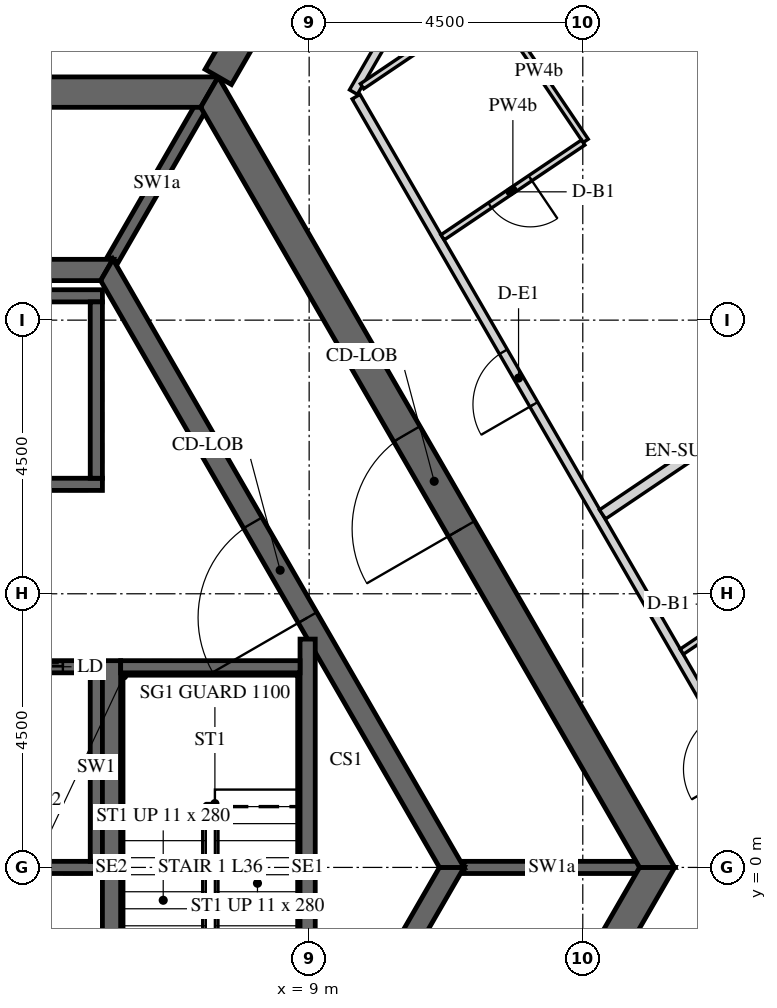
"""IFC4 building model, lengths in metres.
Left out: names, types, materials, properties, quantities, classifications, styles, units other than length and angle.
Written with IfcOpenShell. Run it as: python <this file> out.ifc"""

import sys

from ifc_helpers import new_model, si_unit, direction, frame, frame_2d, origin, place, context, subcontext, project, spatial, polyline, rectangle, outline, extrude, element, fill, save


model = new_model("IFC4")
c1 = context("Model", 3, precision=1e-05, world=origin(), true_north=direction((0.0, 1.0)))
c2 = subcontext(c1, "Body", "Model", "MODEL_VIEW")
j1 = project(units=[si_unit("LENGTHUNIT", "METRE"), si_unit("PLANEANGLEUNIT", "RADIAN")], contexts=[c1])
p1 = place(None, origin())
s1 = spatial("IfcSite", under=j1, at=p1, CompositionType="ELEMENT")
p2 = place(p1, origin())
s2 = spatial("IfcBuilding", under=s1, at=p2, CompositionType="ELEMENT")
p3 = place(p2, frame((0.0, 0.0, 156.6)))
s3 = spatial("IfcBuildingStorey", under=s2, at=p3, CompositionType="ELEMENT", Elevation=156.6)
p4 = place(p3, frame((7.361, -12.75, -0.15), z_axis=(0.0, 0.0, 1.0), x_axis=(0.50000571537, 0.866022103989, 0.0)))
e1 = element("IfcWall", 1, at=p4, inside=s3, PredefinedType="SHEAR", context=c2, shape_type="SweptSolid", body=[
    extrude(outline(polyline([(-0.144, -0.25), (14.867, -0.25), (14.578, 0.25), (0.144, 0.25), (-0.144, -0.25)])), origin(), (0.0, 0.0, 1.0), 3.9),
])
p5 = place(p4, frame((6.49, 0.0, 0.15)))
e2 = element("IfcOpeningElement", 2, at=p5, cuts=e1, PredefinedType="OPENING", context=c2, shape_type="SweptSolid", body=[
    extrude(rectangle(XDim=1.8, YDim=2.4, at=frame_2d((0.9, 1.2))), frame((0.0, 0.26, 0.0), z_axis=(0.0, -1.0, 0.0), x_axis=(1.0, 0.0, 0.0)), (0.0, 0.0, 1.0), 0.52),
])
p6 = place(p3, frame((14.722, 0.0, -0.15), z_axis=(0.0, 0.0, 1.0), x_axis=(-0.50000571537, 0.866022103989, 0.0)))
e3 = element("IfcWall", 3, at=p6, inside=s3, PredefinedType="SHEAR", context=c2, shape_type="SweptSolid", body=[
    extrude(outline(polyline([(-0.144, -0.25), (14.867, -0.25), (14.578, 0.25), (0.144, 0.25), (-0.144, -0.25)])), origin(), (0.0, 0.0, 1.0), 3.9),
])
p7 = place(p6, frame((6.432, 0.0, 0.15)))
e4 = element("IfcOpeningElement", 4, at=p7, cuts=e3, PredefinedType="OPENING", context=c2, shape_type="SweptSolid", body=[
    extrude(rectangle(XDim=1.8, YDim=2.4, at=frame_2d((0.9, 1.2))), frame((0.0, 0.26, 0.0), z_axis=(0.0, -1.0, 0.0), x_axis=(1.0, 0.0, 0.0)), (0.0, 0.0, 1.0), 0.52),
])
p8 = place(p3, frame((7.361, 12.75, -0.15), z_axis=(0.0, 0.0, 1.0), x_axis=(-1.0, 0.0, 0.0)))
e5 = element("IfcWall", 5, at=p8, inside=s3, PredefinedType="SHEAR", context=c2, shape_type="SweptSolid", body=[
    extrude(outline(polyline([(-0.144, -0.25), (14.866, -0.25), (14.578, 0.25), (0.144, 0.25), (-0.144, -0.25)])), origin(), (0.0, 0.0, 1.0), 3.9),
])
p9 = place(p8, frame((6.761, 0.0, 0.15)))
e6 = element("IfcOpeningElement", 6, at=p9, cuts=e5, PredefinedType="OPENING", context=c2, shape_type="SweptSolid", body=[
    extrude(rectangle(XDim=1.2, YDim=2.4, at=frame_2d((0.6, 1.2))), frame((0.0, 0.26, 0.0), z_axis=(0.0, -1.0, 0.0), x_axis=(1.0, 0.0, 0.0)), (0.0, 0.0, 1.0), 0.52),
])
p10 = place(p3, frame((7.506, 13.0, -0.15), z_axis=(0.0, 0.0, 1.0), x_axis=(0.499988271576, 0.866032175087, 0.0)))
e7 = element("IfcWall", 7, at=p10, inside=s3, PredefinedType="SHEAR", context=c2, shape_type="SweptSolid", body=[
    extrude(rectangle(XDim=15.424, YDim=0.5, at=frame_2d((7.712, 0.0))), origin(), (0.0, 0.0, 1.0), 3.9),
])
p11 = place(p10, frame((6.812, 0.0, 0.15)))
e8 = element("IfcOpeningElement", 8, at=p11, cuts=e7, PredefinedType="OPENING", context=c2, shape_type="SweptSolid", body=[
    extrude(rectangle(XDim=1.8, YDim=2.4, at=frame_2d((0.9, 1.2))), frame((0.0, 0.26, 0.0), z_axis=(0.0, -1.0, 0.0), x_axis=(1.0, 0.0, 0.0)), (0.0, 0.0, 1.0), 0.52),
])
p12 = place(p3, frame((5.673, -9.825, -0.15), z_axis=(0.0, 0.0, 1.0), x_axis=(0.499995046907, 0.866028263435, 0.0)))
e9 = element("IfcWall", 9, at=p12, inside=s3, PredefinedType="SHEAR", context=c2, shape_type="SweptSolid", body=[
    extrude(outline(polyline([(-0.101, -0.175), (11.446, -0.175), (11.244, 0.175), (0.101, 0.175), (-0.101, -0.175)])), origin(), (0.0, 0.0, 1.0), 3.9),
])
p13 = place(p12, frame((4.801, 0.0, 0.15)))
e10 = element("IfcOpeningElement", 10, at=p13, cuts=e9, PredefinedType="OPENING", context=c2, shape_type="SweptSolid", body=[
    extrude(rectangle(XDim=1.8, YDim=2.4, at=frame_2d((0.9, 1.2))), frame((0.0, 0.185, 0.0), z_axis=(0.0, -1.0, 0.0), x_axis=(1.0, 0.0, 0.0)), (0.0, 0.0, 1.0), 0.37),
])
p14 = place(p3, frame((11.345, 0.0, -0.15), z_axis=(0.0, 0.0, 1.0), x_axis=(-0.499995046907, 0.866028263435, 0.0)))
e11 = element("IfcWall", 11, at=p14, inside=s3, PredefinedType="SHEAR", context=c2, shape_type="SweptSolid", body=[
    extrude(outline(polyline([(-0.101, -0.175), (11.446, -0.175), (11.244, 0.175), (0.101, 0.175), (-0.101, -0.175)])), origin(), (0.0, 0.0, 1.0), 3.9),
])
p15 = place(p14, frame((4.744, 0.0, 0.15)))
e12 = element("IfcOpeningElement", 12, at=p15, cuts=e11, PredefinedType="OPENING", context=c2, shape_type="SweptSolid", body=[
    extrude(rectangle(XDim=1.8, YDim=2.4, at=frame_2d((0.9, 1.2))), frame((0.0, 0.185, 0.0), z_axis=(0.0, -1.0, 0.0), x_axis=(1.0, 0.0, 0.0)), (0.0, 0.0, 1.0), 0.37),
])
p16 = place(p3, frame((5.673, 9.825, -0.15), z_axis=(0.0, 0.0, 1.0), x_axis=(-1.0, 0.0, 0.0)))
e13 = element("IfcWall", 13, at=p16, inside=s3, PredefinedType="SHEAR", context=c2, shape_type="SweptSolid", body=[
    extrude(outline(polyline([(-0.101, -0.175), (11.446, -0.175), (11.244, 0.175), (0.101, 0.175), (-0.101, -0.175)])), origin(), (0.0, 0.0, 1.0), 3.9),
])
p17 = place(p3, frame((-5.6, 6.3, -0.25), z_axis=(0.0, 0.0, 1.0), x_axis=(1.0, 0.0, 0.0)))
e14 = element("IfcWall", 14, at=p17, inside=s3, PredefinedType="SHEAR", context=c2, shape_type="SweptSolid", body=[
    extrude(rectangle(XDim=11.2, YDim=0.2, at=frame_2d((5.6, 0.0))), origin(), (0.0, 0.0, 1.0), 3.9),
])
p18 = place(p17, frame((8.45, 0.0, 0.25)))
e15 = element("IfcOpeningElement", 15, at=p18, cuts=e14, PredefinedType="OPENING", context=c2, shape_type="SweptSolid", body=[
    extrude(rectangle(XDim=0.9, YDim=2.1, at=frame_2d((0.45, 1.05))), frame((0.0, 0.11, 0.0), z_axis=(0.0, -1.0, 0.0), x_axis=(1.0, 0.0, 0.0)), (0.0, 0.0, 1.0), 0.22),
])
p19 = place(p17, frame((0.65, 0.0, 0.25)))
e16 = element("IfcOpeningElement", 16, at=p19, cuts=e14, PredefinedType="OPENING", context=c2, shape_type="SweptSolid", body=[
    extrude(rectangle(XDim=1.1, YDim=2.1, at=frame_2d((0.55, 1.05))), frame((0.0, 0.11, 0.0), z_axis=(0.0, -1.0, 0.0), x_axis=(1.0, 0.0, 0.0)), (0.0, 0.0, 1.0), 0.22),
])
p20 = place(p17, frame((2.85, 0.0, 0.25)))
e17 = element("IfcOpeningElement", 17, at=p20, cuts=e14, PredefinedType="OPENING", context=c2, shape_type="SweptSolid", body=[
    extrude(rectangle(XDim=1.1, YDim=2.1, at=frame_2d((0.55, 1.05))), frame((0.0, 0.11, 0.0), z_axis=(0.0, -1.0, 0.0), x_axis=(1.0, 0.0, 0.0)), (0.0, 0.0, 1.0), 0.22),
])
p21 = place(p17, frame((5.05, 0.0, 0.25)))
e18 = element("IfcOpeningElement", 18, at=p21, cuts=e14, PredefinedType="OPENING", context=c2, shape_type="SweptSolid", body=[
    extrude(rectangle(XDim=1.1, YDim=2.1, at=frame_2d((0.55, 1.05))), frame((0.0, 0.11, 0.0), z_axis=(0.0, -1.0, 0.0), x_axis=(1.0, 0.0, 0.0)), (0.0, 0.0, 1.0), 0.22),
])
p22 = place(p3, frame((-5.6, 9.4, -0.25), z_axis=(0.0, 0.0, 1.0), x_axis=(1.0, 0.0, 0.0)))
e19 = element("IfcWall", 19, at=p22, inside=s3, PredefinedType="SHEAR", context=c2, shape_type="SweptSolid", body=[
    extrude(rectangle(XDim=11.2, YDim=0.2, at=frame_2d((5.6, 0.0))), origin(), (0.0, 0.0, 1.0), 3.9),
])
p23 = place(p3, frame((5.5, 6.4, -0.25), z_axis=(0.0, 0.0, 1.0), x_axis=(0.0, 1.0, 0.0)))
e20 = element("IfcWall", 20, at=p23, inside=s3, PredefinedType="SHEAR", context=c2, shape_type="SweptSolid", body=[
    extrude(rectangle(XDim=2.9, YDim=0.2, at=frame_2d((1.45, 0.0))), origin(), (0.0, 0.0, 1.0), 3.9),
])
p24 = place(p3, frame((-5.6, 3.3, -0.25), z_axis=(0.0, 0.0, 1.0), x_axis=(1.0, 0.0, 0.0)))
e21 = element("IfcWall", 21, at=p24, inside=s3, PredefinedType="SHEAR", context=c2, shape_type="SweptSolid", body=[
    extrude(rectangle(XDim=11.2, YDim=0.2, at=frame_2d((5.6, 0.0))), origin(), (0.0, 0.0, 1.0), 3.9),
])
p25 = place(p24, frame((0.65, 0.0, 0.25)))
e22 = element("IfcOpeningElement", 22, at=p25, cuts=e21, PredefinedType="OPENING", context=c2, shape_type="SweptSolid", body=[
    extrude(rectangle(XDim=1.1, YDim=2.1, at=frame_2d((0.55, 1.05))), frame((0.0, 0.11, 0.0), z_axis=(0.0, -1.0, 0.0), x_axis=(1.0, 0.0, 0.0)), (0.0, 0.0, 1.0), 0.22),
])
p26 = place(p24, frame((2.85, 0.0, 0.25)))
e23 = element("IfcOpeningElement", 23, at=p26, cuts=e21, PredefinedType="OPENING", context=c2, shape_type="SweptSolid", body=[
    extrude(rectangle(XDim=1.1, YDim=2.1, at=frame_2d((0.55, 1.05))), frame((0.0, 0.11, 0.0), z_axis=(0.0, -1.0, 0.0), x_axis=(1.0, 0.0, 0.0)), (0.0, 0.0, 1.0), 0.22),
])
p27 = place(p24, frame((5.05, 0.0, 0.25)))
e24 = element("IfcOpeningElement", 24, at=p27, cuts=e21, PredefinedType="OPENING", context=c2, shape_type="SweptSolid", body=[
    extrude(rectangle(XDim=1.1, YDim=2.1, at=frame_2d((0.55, 1.05))), frame((0.0, 0.11, 0.0), z_axis=(0.0, -1.0, 0.0), x_axis=(1.0, 0.0, 0.0)), (0.0, 0.0, 1.0), 0.22),
])
p28 = place(p24, frame((7.25, 0.0, 0.25)))
e25 = element("IfcOpeningElement", 25, at=p28, cuts=e21, PredefinedType="OPENING", context=c2, shape_type="SweptSolid", body=[
    extrude(rectangle(XDim=1.1, YDim=2.1, at=frame_2d((0.55, 1.05))), frame((0.0, 0.11, 0.0), z_axis=(0.0, -1.0, 0.0), x_axis=(1.0, 0.0, 0.0)), (0.0, 0.0, 1.0), 0.22),
])
p29 = place(p24, frame((9.45, 0.0, 0.25)))
e26 = element("IfcOpeningElement", 26, at=p29, cuts=e21, PredefinedType="OPENING", context=c2, shape_type="SweptSolid", body=[
    extrude(rectangle(XDim=1.1, YDim=2.1, at=frame_2d((0.55, 1.05))), frame((0.0, 0.11, 0.0), z_axis=(0.0, -1.0, 0.0), x_axis=(1.0, 0.0, 0.0)), (0.0, 0.0, 1.0), 0.22),
])
p30 = place(p3, frame((-5.6, 0.0, -0.25), z_axis=(0.0, 0.0, 1.0), x_axis=(1.0, 0.0, 0.0)))
e27 = element("IfcWall", 27, at=p30, inside=s3, PredefinedType="SHEAR", context=c2, shape_type="SweptSolid", body=[
    extrude(rectangle(XDim=11.2, YDim=0.2, at=frame_2d((5.6, 0.0))), origin(), (0.0, 0.0, 1.0), 3.9),
])
p31 = place(p3, frame((5.5, 0.1, -0.25), z_axis=(0.0, 0.0, 1.0), x_axis=(0.0, 1.0, 0.0)))
e28 = element("IfcWall", 28, at=p31, inside=s3, PredefinedType="SHEAR", context=c2, shape_type="SweptSolid", body=[
    extrude(rectangle(XDim=3.1, YDim=0.2, at=frame_2d((1.55, 0.0))), origin(), (0.0, 0.0, 1.0), 3.9),
])
for number, where, z_axis, x_axis in (
    (29, (11.547, 0.0, -0.15), (0.0, 0.0, 1.0), (1.0, 0.0, 0.0)),
    (30, (5.773, 10.0, -0.15), (0.0, 0.0, 1.0), (0.5, 0.866, 0.0)),
):
    element("IfcWall", number, at=place(p3, frame(where, z_axis=z_axis, x_axis=x_axis)), inside=s3, PredefinedType="SHEAR", context=c2, shape_type="SweptSolid", body=[
        extrude(rectangle(XDim=2.887, YDim=0.2, at=frame_2d((1.443, 0.0))), origin(), (0.0, 0.0, 1.0), 3.9),
    ])
p32 = place(p3, frame((5.75, -3.4, -0.25), z_axis=(0.0, 0.0, 1.0), x_axis=(0.0, 1.0, 0.0)))
e31 = element("IfcWall", 31, at=p32, inside=s3, PredefinedType="SHEAR", context=c2, shape_type="SweptSolid", body=[
    extrude(rectangle(XDim=6.8, YDim=0.3, at=frame_2d((3.4, 0.0))), origin(), (0.0, 0.0, 1.0), 3.9),
])
p33 = place(p3, frame((8.975, -3.755, -0.25), z_axis=(0.0, 0.0, 1.0), x_axis=(0.0, 1.0, 0.0)))
e32 = element("IfcWall", 32, at=p33, inside=s3, PredefinedType="SHEAR", context=c2, shape_type="SweptSolid", body=[
    extrude(rectangle(XDim=7.51, YDim=0.25, at=frame_2d((3.755, 0.0))), origin(), (0.0, 0.0, 1.0), 3.9),
])
p34 = place(p3, frame((5.9, 3.3, -0.25), z_axis=(0.0, 0.0, 1.0), x_axis=(1.0, 0.0, 0.0)))
e33 = element("IfcWall", 33, at=p34, inside=s3, PredefinedType="SHEAR", context=c2, shape_type="SweptSolid", body=[
    extrude(rectangle(XDim=2.95, YDim=0.2, at=frame_2d((1.475, 0.0))), origin(), (0.0, 0.0, 1.0), 3.9),
])
p35 = place(p3, frame((10.714, -11.043, 0.0), z_axis=(0.0, 0.0, 1.0), x_axis=(0.500001980452, 0.866024260367, 0.0)))
e34 = element("IfcWall", 34, at=p35, inside=s3, PredefinedType="PARTITIONING", context=c2, shape_type="SweptSolid", body=[
    extrude(rectangle(XDim=12.752, YDim=0.15, at=frame_2d((6.376, 0.0))), origin(), (0.0, 0.0, 1.0), 2.823),
])
p36 = place(p35, frame((3.625, 0.0, 0.0)))
e35 = element("IfcOpeningElement", 35, at=p36, cuts=e34, PredefinedType="OPENING", context=c2, shape_type="SweptSolid", body=[
    extrude(rectangle(XDim=1.0, YDim=2.1, at=frame_2d((0.5, 1.05))), frame((0.0, 0.085, 0.0), z_axis=(0.0, -1.0, 0.0), x_axis=(1.0, 0.0, 0.0)), (0.0, 0.0, 1.0), 0.17),
])
p37 = place(p35, frame((11.602, 0.0, 0.0)))
e36 = element("IfcOpeningElement", 36, at=p37, cuts=e34, PredefinedType="OPENING", context=c2, shape_type="SweptSolid", body=[
    extrude(rectangle(XDim=1.0, YDim=2.1, at=frame_2d((0.5, 1.05))), frame((0.0, 0.085, 0.0), z_axis=(0.0, -1.0, 0.0), x_axis=(1.0, 0.0, 0.0)), (0.0, 0.0, 1.0), 0.17),
])
p38 = place(p3, frame((17.046, 0.075, 0.0), z_axis=(0.0, 0.0, 1.0), x_axis=(-0.499999403554, 0.866025748143, 0.0)))
e37 = element("IfcWall", 37, at=p38, inside=s3, PredefinedType="PARTITIONING", context=c2, shape_type="SweptSolid", body=[
    extrude(rectangle(XDim=14.549, YDim=0.15, at=frame_2d((7.275, 0.0))), origin(), (0.0, 0.0, 1.0), 2.823),
])
p39 = place(p38, frame((1.781, 0.0, 0.0)))
e38 = element("IfcOpeningElement", 38, at=p39, cuts=e37, PredefinedType="OPENING", context=c2, shape_type="SweptSolid", body=[
    extrude(rectangle(XDim=1.0, YDim=2.1, at=frame_2d((0.5, 1.05))), frame((0.0, 0.085, 0.0), z_axis=(0.0, -1.0, 0.0), x_axis=(1.0, 0.0, 0.0)), (0.0, 0.0, 1.0), 0.17),
])
p40 = place(p38, frame((8.705, 0.0, 0.0)))
e39 = element("IfcOpeningElement", 39, at=p40, cuts=e37, PredefinedType="OPENING", context=c2, shape_type="SweptSolid", body=[
    extrude(rectangle(XDim=1.0, YDim=2.1, at=frame_2d((0.5, 1.05))), frame((0.0, 0.085, 0.0), z_axis=(0.0, -1.0, 0.0), x_axis=(1.0, 0.0, 0.0)), (0.0, 0.0, 1.0), 0.17),
])
p41 = place(p3, frame((9.728, 12.75, 0.0), z_axis=(0.0, 0.0, 1.0), x_axis=(0.500007149838, 0.866021275784, 0.0)))
e40 = element("IfcWall", 40, at=p41, inside=s3, PredefinedType="PARTITIONING", context=c2, shape_type="SweptSolid", body=[
    extrude(rectangle(XDim=8.017, YDim=0.15, at=frame_2d((4.009, 0.0))), origin(), (0.0, 0.0, 1.0), 2.823),
])
p42 = place(p3, frame((17.53, 5.168, 0.0), z_axis=(0.0, 0.0, 1.0), x_axis=(-0.829031257997, -0.559202265073, 0.0)))
e41 = element("IfcWall", 41, at=p42, inside=s3, PredefinedType="PARTITIONING", context=c2, shape_type="SweptSolid", body=[
    extrude(rectangle(XDim=2.898, YDim=0.1, at=frame_2d((1.449, 0.0))), origin(), (0.0, 0.0, 1.0), 2.823),
])
p43 = place(p42, frame((1.1, 0.0, 0.0)))
e42 = element("IfcOpeningElement", 42, at=p43, cuts=e41, PredefinedType="OPENING", context=c2, shape_type="SweptSolid", body=[
    extrude(rectangle(XDim=0.8, YDim=2.1, at=frame_2d((0.4, 1.05))), frame((0.0, 0.06, 0.0), z_axis=(0.0, -1.0, 0.0), x_axis=(1.0, 0.0, 0.0)), (0.0, 0.0, 1.0), 0.12),
])
p44 = place(p3, frame((24.389, 12.931, 0.0), z_axis=(0.0, 0.0, 1.0), x_axis=(-0.829049407957, -0.559175356365, 0.0)))
e43 = element("IfcWall", 43, at=p44, inside=s3, PredefinedType="PARTITIONING", context=c2, shape_type="SweptSolid", body=[
    extrude(rectangle(XDim=12.743, YDim=0.18, at=frame_2d((6.372, 0.0))), origin(), (0.0, 0.0, 1.0), 2.823),
])
p45 = place(p3, frame((9.87, 12.846, 0.0), z_axis=(0.0, 0.0, 1.0), x_axis=(0.829045266323, 0.559181496821, 0.0)))
e44 = element("IfcWall", 44, at=p45, inside=s3, PredefinedType="PARTITIONING", context=c2, shape_type="SweptSolid", body=[
    extrude(rectangle(XDim=2.548, YDim=0.1, at=frame_2d((1.274, 0.0))), origin(), (0.0, 0.0, 1.0), 2.823),
])
p46 = place(p3, frame((12.01, 14.229, 0.0), z_axis=(0.0, 0.0, 1.0), x_axis=(0.559158698756, -0.8290606429, 0.0)))
e45 = element("IfcWall", 45, at=p46, inside=s3, PredefinedType="PARTITIONING", context=c2, shape_type="SweptSolid", body=[
    extrude(rectangle(XDim=2.75, YDim=0.1, at=frame_2d((1.375, 0.0))), origin(), (0.0, 0.0, 1.0), 2.823),
])
p47 = place(p3, frame((13.506, 11.921, 0.0), z_axis=(0.0, 0.0, 1.0), x_axis=(-0.829048535811, -0.559176649431, 0.0)))
e46 = element("IfcWall", 46, at=p47, inside=s3, PredefinedType="PARTITIONING", context=c2, shape_type="SweptSolid", body=[
    extrude(rectangle(XDim=2.789, YDim=0.1, at=frame_2d((1.395, 0.0))), origin(), (0.0, 0.0, 1.0), 2.823),
])
p48 = place(p47, frame((1.05, 0.0, 0.0)))
e47 = element("IfcOpeningElement", 47, at=p48, cuts=e46, PredefinedType="OPENING", context=c2, shape_type="SweptSolid", body=[
    extrude(rectangle(XDim=0.8, YDim=2.1, at=frame_2d((0.4, 1.05))), frame((0.0, 0.06, 0.0), z_axis=(0.0, -1.0, 0.0), x_axis=(1.0, 0.0, 0.0)), (0.0, 0.0, 1.0), 0.12),
])
p49 = place(p7, origin())
e48 = element("IfcDoor", 48, at=p49, inside=s3, OperationType="DOUBLE_DOOR_SINGLE_SWING", PredefinedType="DOOR", context=c2, shape_type="SweptSolid", body=[
    extrude(rectangle(XDim=1.8, YDim=2.4, at=frame_2d((0.9, 1.2))), frame((0.0, 0.025, 0.0), z_axis=(0.0, -1.0, 0.0), x_axis=(1.0, 0.0, 0.0)), (0.0, 0.0, 1.0), 0.05),
])
fill(e4, e48)
p50 = place(p15, origin())
e49 = element("IfcDoor", 49, at=p50, inside=s3, OperationType="DOUBLE_DOOR_SINGLE_SWING", PredefinedType="DOOR", context=c2, shape_type="SweptSolid", body=[
    extrude(rectangle(XDim=1.8, YDim=2.4, at=frame_2d((0.9, 1.2))), frame((0.0, 0.025, 0.0), z_axis=(0.0, -1.0, 0.0), x_axis=(1.0, 0.0, 0.0)), (0.0, 0.0, 1.0), 0.05),
])
fill(e12, e49)
p51 = place(p29, origin())
e50 = element("IfcDoor", 50, at=p51, inside=s3, OperationType="SLIDING_TO_LEFT", PredefinedType="DOOR", context=c2, shape_type="SweptSolid", body=[
    extrude(rectangle(XDim=1.1, YDim=2.1, at=frame_2d((0.55, 1.05))), frame((0.0, 0.025, 0.0), z_axis=(0.0, -1.0, 0.0), x_axis=(1.0, 0.0, 0.0)), (0.0, 0.0, 1.0), 0.05),
])
fill(e26, e50)
p52 = place(p40, origin())
e51 = element("IfcDoor", 51, at=p52, inside=s3, OperationType="SINGLE_SWING_RIGHT", PredefinedType="DOOR", context=c2, shape_type="SweptSolid", body=[
    extrude(rectangle(XDim=1.0, YDim=2.1, at=frame_2d((0.5, 1.05))), frame((0.0, 0.025, 0.0), z_axis=(0.0, -1.0, 0.0), x_axis=(1.0, 0.0, 0.0)), (0.0, 0.0, 1.0), 0.05),
])
fill(e39, e51)
p53 = place(p48, origin())
e52 = element("IfcDoor", 52, at=p53, inside=s3, OperationType="SINGLE_SWING_LEFT", PredefinedType="DOOR", context=c2, shape_type="SweptSolid", body=[
    extrude(rectangle(XDim=0.8, YDim=2.1, at=frame_2d((0.4, 1.05))), frame((0.0, 0.025, 0.0), z_axis=(0.0, -1.0, 0.0), x_axis=(1.0, 0.0, 0.0)), (0.0, 0.0, 1.0), 0.05),
])
fill(e47, e52)
save(model, sys.argv[1])
